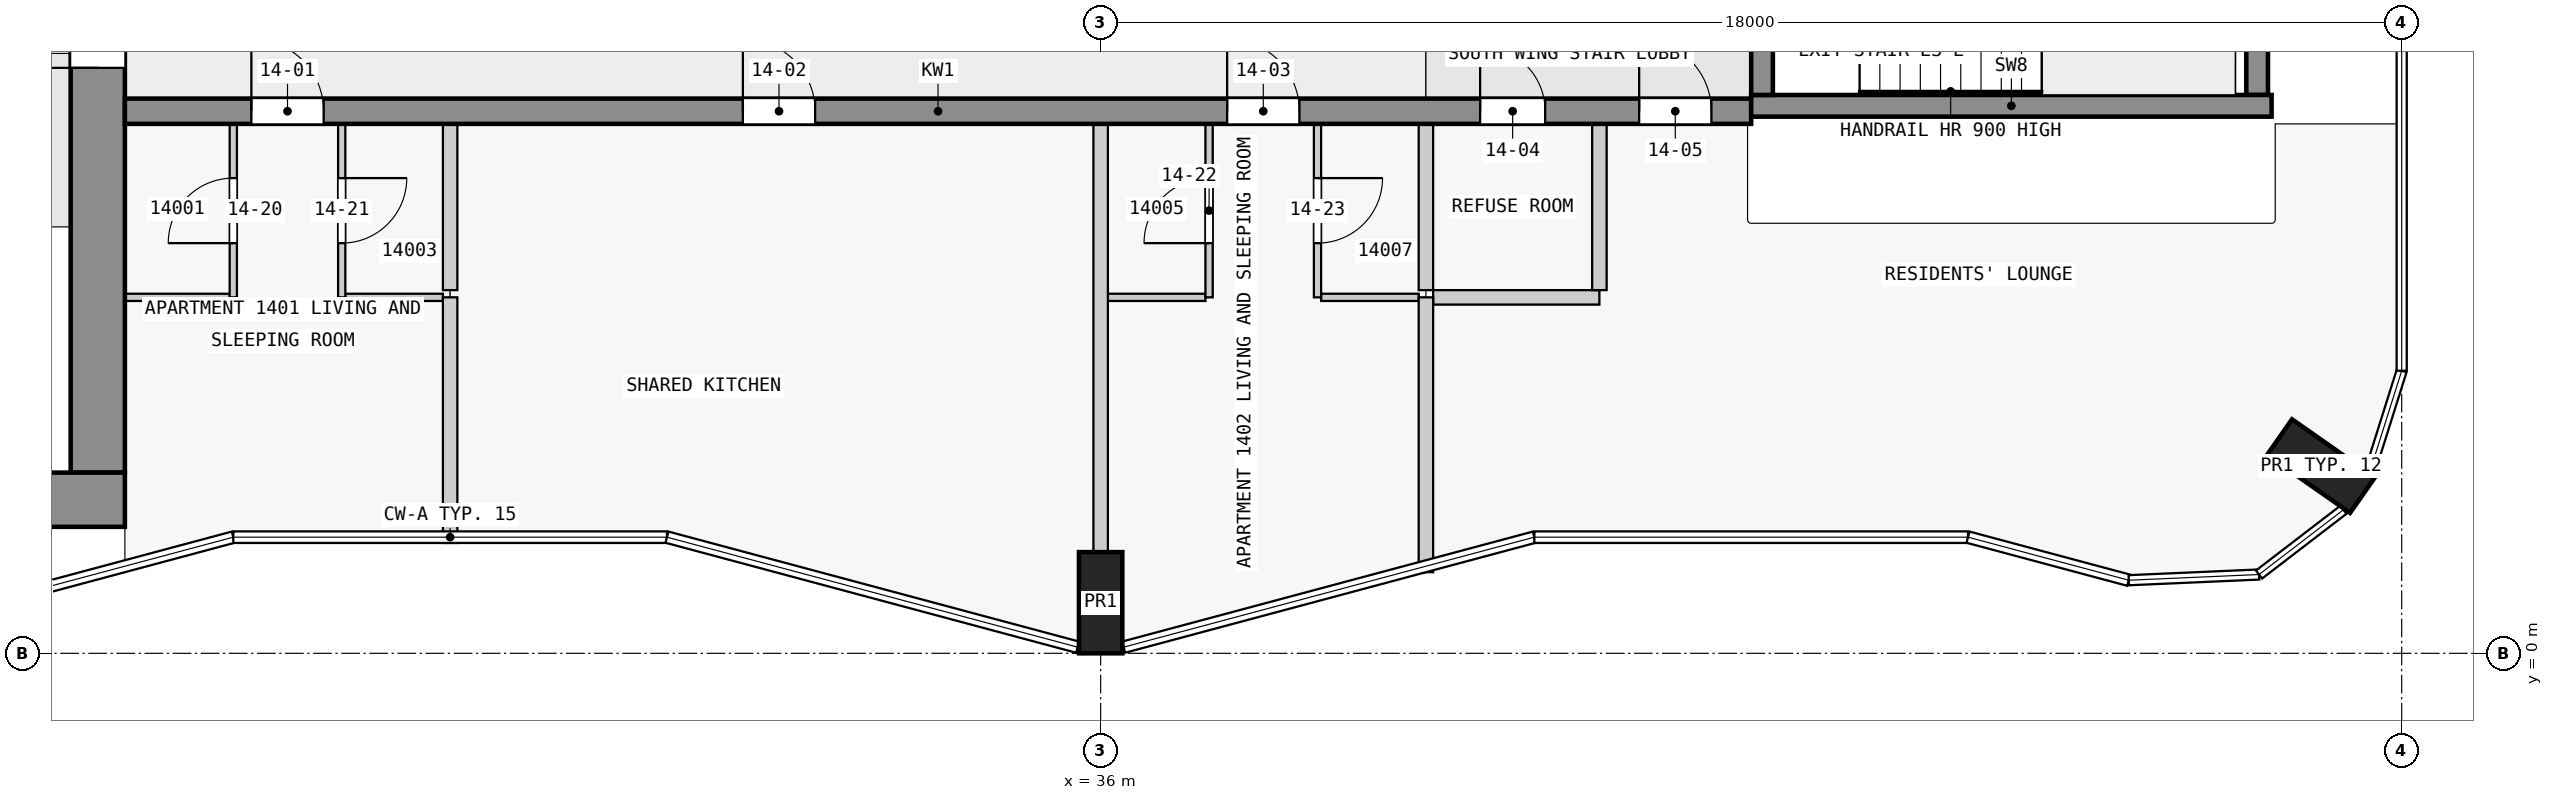
"""IFC4 building model, lengths in metres.
Left out: names, types, materials, properties, quantities, classifications, styles, units other than length and angle.
Written with IfcOpenShell. Run it as: python <this file> out.ifc"""

import sys

from ifc_helpers import new_model, si_unit, direction, frame, frame_2d, origin, origin_2d, place, context, subcontext, project, spatial, rectangle, extrude, element, fill, save


model = new_model("IFC4")
c1 = context("Model", 3, precision=1e-05, world=origin(), true_north=direction((0.0, 1.0)))
c2 = subcontext(c1, "Body", "Model", "MODEL_VIEW")
j1 = project(units=[si_unit("LENGTHUNIT", "METRE"), si_unit("PLANEANGLEUNIT", "RADIAN")], contexts=[c1])
p1 = place(None, origin())
s1 = spatial("IfcSite", under=j1, at=p1, CompositionType="ELEMENT")
p2 = place(p1, origin())
s2 = spatial("IfcBuilding", under=s1, at=p2, CompositionType="ELEMENT")
p3 = place(p2, frame((0.0, 0.0, 58.3)))
s3 = spatial("IfcBuildingStorey", under=s2, at=p3, CompositionType="ELEMENT", Elevation=58.3)
for number, where, z_axis, x_axis in (
    (1, (36.0, 0.7, 0.0), (0.0, 0.0, 1.0), (1.0, 0.0, 0.0)),
    (2, (52.884, 2.59, 0.0), (0.0, 0.0, 1.0), (0.574, 0.819, 0.0)),
):
    element("IfcColumn", number, at=place(p3, frame(where, z_axis=z_axis, x_axis=x_axis)), inside=s3, PredefinedType="COLUMN", context=c2, shape_type="SweptSolid", body=[
        extrude(rectangle(XDim=0.6, YDim=1.4, at=origin_2d()), origin(), (0.0, 0.0, 1.0), 3.5),
    ])
p4 = place(p3, frame((1.55, 2.125, 0.0), z_axis=(0.0, 0.0, 1.0), x_axis=(1.0, 0.0, 0.0)))
e3 = element("IfcWall", 3, at=p4, inside=s3, PredefinedType="SHEAR", context=c2, shape_type="SweptSolid", body=[
    extrude(rectangle(XDim=20.95, YDim=0.75, at=frame_2d((10.475, 0.0))), origin(), (0.0, 0.0, 1.0), 3.25),
])
p5 = place(p3, frame((22.125, 2.5, 0.0), z_axis=(0.0, 0.0, 1.0), x_axis=(0.0, 1.0, 0.0)))
e4 = element("IfcWall", 4, at=p5, inside=s3, PredefinedType="SHEAR", context=c2, shape_type="SweptSolid", body=[
    extrude(rectangle(XDim=14.75, YDim=0.75, at=frame_2d((7.375, 0.0))), origin(), (0.0, 0.0, 1.0), 3.25),
])
p6 = place(p5, frame((5.6, 0.0, 0.0)))
e5 = element("IfcOpeningElement", 5, at=p6, cuts=e4, PredefinedType="OPENING", context=c2, shape_type="SweptSolid", body=[
    extrude(rectangle(XDim=1.8, YDim=2.1, at=frame_2d((0.9, 1.05))), frame((0.0, 0.385, 0.0), z_axis=(0.0, -1.0, 0.0), x_axis=(1.0, 0.0, 0.0)), (0.0, 0.0, 1.0), 0.77),
])
p7 = place(p3, frame((45.15, 7.725, 0.0), z_axis=(0.0, 0.0, 1.0), x_axis=(0.0, 1.0, 0.0)))
e6 = element("IfcWall", 6, at=p7, inside=s3, PredefinedType="SHEAR", context=c2, shape_type="SweptSolid", body=[
    extrude(rectangle(XDim=2.55, YDim=0.3, at=frame_2d((1.275, 0.0))), origin(), (0.0, 0.0, 1.0), 3.5),
])
p8 = place(p7, frame((0.725, 0.0, 0.0)))
e7 = element("IfcOpeningElement", 7, at=p8, cuts=e6, PredefinedType="OPENING", context=c2, shape_type="SweptSolid", body=[
    extrude(rectangle(XDim=1.1, YDim=2.1, at=frame_2d((0.55, 1.05))), frame((0.0, 0.16, 0.0), z_axis=(0.0, -1.0, 0.0), x_axis=(1.0, 0.0, 0.0)), (0.0, 0.0, 1.0), 0.32),
])
p9 = place(p3, frame((52.0, 7.725, 0.0), z_axis=(0.0, 0.0, 1.0), x_axis=(0.0, 1.0, 0.0)))
e8 = element("IfcWall", 8, at=p9, inside=s3, PredefinedType="SHEAR", context=c2, shape_type="SweptSolid", body=[
    extrude(rectangle(XDim=2.55, YDim=0.3, at=frame_2d((1.275, 0.0))), origin(), (0.0, 0.0, 1.0), 3.5),
])
p10 = place(p3, frame((45.0, 7.575, 0.0), z_axis=(0.0, 0.0, 1.0), x_axis=(1.0, 0.0, 0.0)))
e9 = element("IfcWall", 9, at=p10, inside=s3, PredefinedType="SHEAR", context=c2, shape_type="SweptSolid", body=[
    extrude(rectangle(XDim=7.2, YDim=0.3, at=frame_2d((3.6, 0.0))), origin(), (0.0, 0.0, 1.0), 3.5),
])
p11 = place(p3, frame((22.5, 7.5, 0.0), z_axis=(0.0, 0.0, 1.0), x_axis=(1.0, 0.0, 0.0)))
e10 = element("IfcWall", 10, at=p11, inside=s3, PredefinedType="SHEAR", context=c2, shape_type="SweptSolid", body=[
    extrude(rectangle(XDim=22.5, YDim=0.35, at=frame_2d((11.25, 0.0))), origin(), (0.0, 0.0, 1.0), 3.25),
])
p12 = place(p11, frame((1.75, 0.0, 0.0)))
e11 = element("IfcOpeningElement", 11, at=p12, cuts=e10, PredefinedType="OPENING", context=c2, shape_type="SweptSolid", body=[
    extrude(rectangle(XDim=1.0, YDim=2.1, at=frame_2d((0.5, 1.05))), frame((0.0, 0.185, 0.0), z_axis=(0.0, -1.0, 0.0), x_axis=(1.0, 0.0, 0.0)), (0.0, 0.0, 1.0), 0.37),
])
p13 = place(p11, frame((8.55, 0.0, 0.0)))
e12 = element("IfcOpeningElement", 12, at=p13, cuts=e10, PredefinedType="OPENING", context=c2, shape_type="SweptSolid", body=[
    extrude(rectangle(XDim=1.0, YDim=2.1, at=frame_2d((0.5, 1.05))), frame((0.0, 0.185, 0.0), z_axis=(0.0, -1.0, 0.0), x_axis=(1.0, 0.0, 0.0)), (0.0, 0.0, 1.0), 0.37),
])
p14 = place(p11, frame((15.25, 0.0, 0.0)))
e13 = element("IfcOpeningElement", 13, at=p14, cuts=e10, PredefinedType="OPENING", context=c2, shape_type="SweptSolid", body=[
    extrude(rectangle(XDim=1.0, YDim=2.1, at=frame_2d((0.5, 1.05))), frame((0.0, 0.185, 0.0), z_axis=(0.0, -1.0, 0.0), x_axis=(1.0, 0.0, 0.0)), (0.0, 0.0, 1.0), 0.37),
])
p15 = place(p11, frame((18.75, 0.0, 0.0)))
e14 = element("IfcOpeningElement", 14, at=p15, cuts=e10, PredefinedType="OPENING", context=c2, shape_type="SweptSolid", body=[
    extrude(rectangle(XDim=0.9, YDim=2.1, at=frame_2d((0.45, 1.05))), frame((0.0, 0.185, 0.0), z_axis=(0.0, -1.0, 0.0), x_axis=(1.0, 0.0, 0.0)), (0.0, 0.0, 1.0), 0.37),
])
p16 = place(p11, frame((20.95, 0.0, 0.0)))
e15 = element("IfcOpeningElement", 15, at=p16, cuts=e10, PredefinedType="OPENING", context=c2, shape_type="SweptSolid", body=[
    extrude(rectangle(XDim=1.0, YDim=2.1, at=frame_2d((0.5, 1.05))), frame((0.0, 0.185, 0.0), z_axis=(0.0, -1.0, 0.0), x_axis=(1.0, 0.0, 0.0)), (0.0, 0.0, 1.0), 0.37),
])
p17 = place(p3, frame((22.5, 4.925, 0.0), z_axis=(0.0, 0.0, 1.0), x_axis=(1.0, 0.0, 0.0)))
e16 = element("IfcWall", 16, at=p17, inside=s3, PredefinedType="PARTITIONING", context=c2, shape_type="SweptSolid", body=[
    extrude(rectangle(XDim=1.45, YDim=0.1, at=frame_2d((0.725, 0.0))), origin(), (0.0, 0.0, 1.0), 3.25),
])
for number, where, z_axis, x_axis in (
    (17, (25.55, 4.925, 0.0), (0.0, 0.0, 1.0), (1.0, 0.0, 0.0)),
    (18, (36.1, 4.925, 0.0), (0.0, 0.0, 1.0), (1.0, 0.0, 0.0)),
    (19, (39.05, 4.925, 0.0), (0.0, 0.0, 1.0), (1.0, 0.0, 0.0)),
):
    element("IfcWall", number, at=place(p3, frame(where, z_axis=z_axis, x_axis=x_axis)), inside=s3, PredefinedType="PARTITIONING", context=c2, shape_type="SweptSolid", body=[
        extrude(rectangle(XDim=1.35, YDim=0.1, at=frame_2d((0.675, 0.0))), origin(), (0.0, 0.0, 1.0), 3.25),
    ])
p18 = place(p3, frame((40.6, 4.925, 0.0), z_axis=(0.0, 0.0, 1.0), x_axis=(1.0, 0.0, 0.0)))
e20 = element("IfcWall", 20, at=p18, inside=s3, PredefinedType="PARTITIONING", context=c2, shape_type="SweptSolid", body=[
    extrude(rectangle(XDim=2.3, YDim=0.2, at=frame_2d((1.15, 0.0))), origin(), (0.0, 0.0, 1.0), 3.25),
])
p19 = place(p3, frame((24.0, 4.925, 0.0), z_axis=(0.0, 0.0, 1.0), x_axis=(0.0, 1.0, 0.0)))
e21 = element("IfcWall", 21, at=p19, inside=s3, PredefinedType="PARTITIONING", context=c2, shape_type="SweptSolid", body=[
    extrude(rectangle(XDim=2.4, YDim=0.1, at=frame_2d((1.2, 0.0))), origin(), (0.0, 0.0, 1.0), 3.25),
])
p20 = place(p19, frame((0.75, 0.0, 0.0)))
e22 = element("IfcOpeningElement", 22, at=p20, cuts=e21, PredefinedType="OPENING", context=c2, shape_type="SweptSolid", body=[
    extrude(rectangle(XDim=0.9, YDim=2.1, at=frame_2d((0.45, 1.05))), frame((0.0, 0.06, 0.0), z_axis=(0.0, -1.0, 0.0), x_axis=(1.0, 0.0, 0.0)), (0.0, 0.0, 1.0), 0.12),
])
p21 = place(p3, frame((25.5, 7.325, 0.0), z_axis=(0.0, 0.0, 1.0), x_axis=(0.0, -1.0, 0.0)))
e23 = element("IfcWall", 23, at=p21, inside=s3, PredefinedType="PARTITIONING", context=c2, shape_type="SweptSolid", body=[
    extrude(rectangle(XDim=2.4, YDim=0.1, at=frame_2d((1.2, 0.0))), origin(), (0.0, 0.0, 1.0), 3.25),
])
p22 = place(p21, frame((0.75, 0.0, 0.0)))
e24 = element("IfcOpeningElement", 24, at=p22, cuts=e23, PredefinedType="OPENING", context=c2, shape_type="SweptSolid", body=[
    extrude(rectangle(XDim=0.9, YDim=2.1, at=frame_2d((0.45, 1.05))), frame((0.0, 0.06, 0.0), z_axis=(0.0, -1.0, 0.0), x_axis=(1.0, 0.0, 0.0)), (0.0, 0.0, 1.0), 0.12),
])
p23 = place(p3, frame((27.0, 4.925, 0.0), z_axis=(0.0, 0.0, 1.0), x_axis=(0.0, -1.0, 0.0)))
e25 = element("IfcWall", 25, at=p23, inside=s3, PredefinedType="PARTITIONING", context=c2, shape_type="SweptSolid", body=[
    extrude(rectangle(XDim=3.398, YDim=0.2, at=frame_2d((1.699, 0.0))), origin(), (0.0, 0.0, 1.0), 3.25),
])
p24 = place(p3, frame((27.0, 5.025, 0.0), z_axis=(0.0, 0.0, 1.0), x_axis=(0.0, 1.0, 0.0)))
e26 = element("IfcWall", 26, at=p24, inside=s3, PredefinedType="PARTITIONING", context=c2, shape_type="SweptSolid", body=[
    extrude(rectangle(XDim=2.3, YDim=0.2, at=frame_2d((1.15, 0.0))), origin(), (0.0, 0.0, 1.0), 3.25),
])
p25 = place(p3, frame((36.0, 1.4, 0.0), z_axis=(0.0, 0.0, 1.0), x_axis=(0.0, 1.0, 0.0)))
e27 = element("IfcWall", 27, at=p25, inside=s3, PredefinedType="PARTITIONING", context=c2, shape_type="SweptSolid", body=[
    extrude(rectangle(XDim=5.925, YDim=0.2, at=frame_2d((2.962, 0.0))), origin(), (0.0, 0.0, 1.0), 3.25),
])
p26 = place(p3, frame((37.5, 4.925, 0.0), z_axis=(0.0, 0.0, 1.0), x_axis=(0.0, 1.0, 0.0)))
e28 = element("IfcWall", 28, at=p26, inside=s3, PredefinedType="PARTITIONING", context=c2, shape_type="SweptSolid", body=[
    extrude(rectangle(XDim=2.4, YDim=0.1, at=frame_2d((1.2, 0.0))), origin(), (0.0, 0.0, 1.0), 3.25),
])
p27 = place(p26, frame((0.75, 0.0, 0.0)))
e29 = element("IfcOpeningElement", 29, at=p27, cuts=e28, PredefinedType="OPENING", context=c2, shape_type="SweptSolid", body=[
    extrude(rectangle(XDim=0.9, YDim=2.1, at=frame_2d((0.45, 1.05))), frame((0.0, 0.06, 0.0), z_axis=(0.0, -1.0, 0.0), x_axis=(1.0, 0.0, 0.0)), (0.0, 0.0, 1.0), 0.12),
])
p28 = place(p3, frame((39.0, 7.325, 0.0), z_axis=(0.0, 0.0, 1.0), x_axis=(0.0, -1.0, 0.0)))
e30 = element("IfcWall", 30, at=p28, inside=s3, PredefinedType="PARTITIONING", context=c2, shape_type="SweptSolid", body=[
    extrude(rectangle(XDim=2.4, YDim=0.1, at=frame_2d((1.2, 0.0))), origin(), (0.0, 0.0, 1.0), 3.25),
])
p29 = place(p28, frame((0.75, 0.0, 0.0)))
e31 = element("IfcOpeningElement", 31, at=p29, cuts=e30, PredefinedType="OPENING", context=c2, shape_type="SweptSolid", body=[
    extrude(rectangle(XDim=0.9, YDim=2.1, at=frame_2d((0.45, 1.05))), frame((0.0, 0.06, 0.0), z_axis=(0.0, -1.0, 0.0), x_axis=(1.0, 0.0, 0.0)), (0.0, 0.0, 1.0), 0.12),
])
p30 = place(p3, frame((40.5, 4.925, 0.0), z_axis=(0.0, 0.0, 1.0), x_axis=(0.0, -1.0, 0.0)))
e32 = element("IfcWall", 32, at=p30, inside=s3, PredefinedType="PARTITIONING", context=c2, shape_type="SweptSolid", body=[
    extrude(rectangle(XDim=3.803, YDim=0.2, at=frame_2d((1.901, 0.0))), origin(), (0.0, 0.0, 1.0), 3.25),
])
for number, where, z_axis, x_axis in (
    (33, (40.5, 5.025, 0.0), (0.0, 0.0, 1.0), (0.0, 1.0, 0.0)),
    (34, (42.9, 5.025, 0.0), (0.0, 0.0, 1.0), (0.0, 1.0, 0.0)),
):
    element("IfcWall", number, at=place(p3, frame(where, z_axis=z_axis, x_axis=x_axis)), inside=s3, PredefinedType="PARTITIONING", context=c2, shape_type="SweptSolid", body=[
        extrude(rectangle(XDim=2.3, YDim=0.2, at=frame_2d((1.15, 0.0))), origin(), (0.0, 0.0, 1.0), 3.25),
    ])
p31 = place(p6, origin())
e35 = element("IfcDoor", 35, at=p31, inside=s3, OperationType="DOUBLE_DOOR_SINGLE_SWING", PredefinedType="DOOR", context=c2, shape_type="SweptSolid", body=[
    extrude(rectangle(XDim=1.8, YDim=2.1, at=frame_2d((0.9, 1.05))), frame((0.0, 0.025, 0.0), z_axis=(0.0, -1.0, 0.0), x_axis=(1.0, 0.0, 0.0)), (0.0, 0.0, 1.0), 0.05),
])
fill(e5, e35)
p32 = place(p12, origin())
e36 = element("IfcDoor", 36, at=p32, inside=s3, OperationType="SINGLE_SWING_LEFT", PredefinedType="DOOR", context=c2, shape_type="SweptSolid", body=[
    extrude(rectangle(XDim=1.0, YDim=2.1, at=frame_2d((0.5, 1.05))), frame((0.0, 0.025, 0.0), z_axis=(0.0, -1.0, 0.0), x_axis=(1.0, 0.0, 0.0)), (0.0, 0.0, 1.0), 0.05),
])
fill(e11, e36)
p33 = place(p13, origin())
e37 = element("IfcDoor", 37, at=p33, inside=s3, OperationType="SINGLE_SWING_LEFT", PredefinedType="DOOR", context=c2, shape_type="SweptSolid", body=[
    extrude(rectangle(XDim=1.0, YDim=2.1, at=frame_2d((0.5, 1.05))), frame((0.0, 0.025, 0.0), z_axis=(0.0, -1.0, 0.0), x_axis=(1.0, 0.0, 0.0)), (0.0, 0.0, 1.0), 0.05),
])
fill(e12, e37)
p34 = place(p14, origin())
e38 = element("IfcDoor", 38, at=p34, inside=s3, OperationType="SINGLE_SWING_RIGHT", PredefinedType="DOOR", context=c2, shape_type="SweptSolid", body=[
    extrude(rectangle(XDim=1.0, YDim=2.1, at=frame_2d((0.5, 1.05))), frame((0.0, 0.025, 0.0), z_axis=(0.0, -1.0, 0.0), x_axis=(1.0, 0.0, 0.0)), (0.0, 0.0, 1.0), 0.05),
])
fill(e13, e38)
p35 = place(p15, origin())
e39 = element("IfcDoor", 39, at=p35, inside=s3, OperationType="SINGLE_SWING_RIGHT", PredefinedType="DOOR", context=c2, shape_type="SweptSolid", body=[
    extrude(rectangle(XDim=0.9, YDim=2.1, at=frame_2d((0.45, 1.05))), frame((0.0, 0.025, 0.0), z_axis=(0.0, -1.0, 0.0), x_axis=(1.0, 0.0, 0.0)), (0.0, 0.0, 1.0), 0.05),
])
fill(e14, e39)
p36 = place(p16, origin())
e40 = element("IfcDoor", 40, at=p36, inside=s3, OperationType="SINGLE_SWING_RIGHT", PredefinedType="DOOR", context=c2, shape_type="SweptSolid", body=[
    extrude(rectangle(XDim=1.0, YDim=2.1, at=frame_2d((0.5, 1.05))), frame((0.0, 0.025, 0.0), z_axis=(0.0, -1.0, 0.0), x_axis=(1.0, 0.0, 0.0)), (0.0, 0.0, 1.0), 0.05),
])
fill(e15, e40)
p37 = place(p20, origin())
e41 = element("IfcDoor", 41, at=p37, inside=s3, OperationType="SINGLE_SWING_LEFT", PredefinedType="DOOR", context=c2, shape_type="SweptSolid", body=[
    extrude(rectangle(XDim=0.9, YDim=2.1, at=frame_2d((0.45, 1.05))), frame((0.0, 0.025, 0.0), z_axis=(0.0, -1.0, 0.0), x_axis=(1.0, 0.0, 0.0)), (0.0, 0.0, 1.0), 0.05),
])
fill(e22, e41)
p38 = place(p22, origin())
e42 = element("IfcDoor", 42, at=p38, inside=s3, OperationType="SINGLE_SWING_LEFT", PredefinedType="DOOR", context=c2, shape_type="SweptSolid", body=[
    extrude(rectangle(XDim=0.9, YDim=2.1, at=frame_2d((0.45, 1.05))), frame((0.0, 0.025, 0.0), z_axis=(0.0, -1.0, 0.0), x_axis=(1.0, 0.0, 0.0)), (0.0, 0.0, 1.0), 0.05),
])
fill(e24, e42)
p39 = place(p27, origin())
e43 = element("IfcDoor", 43, at=p39, inside=s3, OperationType="SINGLE_SWING_LEFT", PredefinedType="DOOR", context=c2, shape_type="SweptSolid", body=[
    extrude(rectangle(XDim=0.9, YDim=2.1, at=frame_2d((0.45, 1.05))), frame((0.0, 0.025, 0.0), z_axis=(0.0, -1.0, 0.0), x_axis=(1.0, 0.0, 0.0)), (0.0, 0.0, 1.0), 0.05),
])
fill(e29, e43)
p40 = place(p29, origin())
e44 = element("IfcDoor", 44, at=p40, inside=s3, OperationType="SINGLE_SWING_LEFT", PredefinedType="DOOR", context=c2, shape_type="SweptSolid", body=[
    extrude(rectangle(XDim=0.9, YDim=2.1, at=frame_2d((0.45, 1.05))), frame((0.0, 0.025, 0.0), z_axis=(0.0, -1.0, 0.0), x_axis=(1.0, 0.0, 0.0)), (0.0, 0.0, 1.0), 0.05),
])
fill(e31, e44)
save(model, sys.argv[1])
